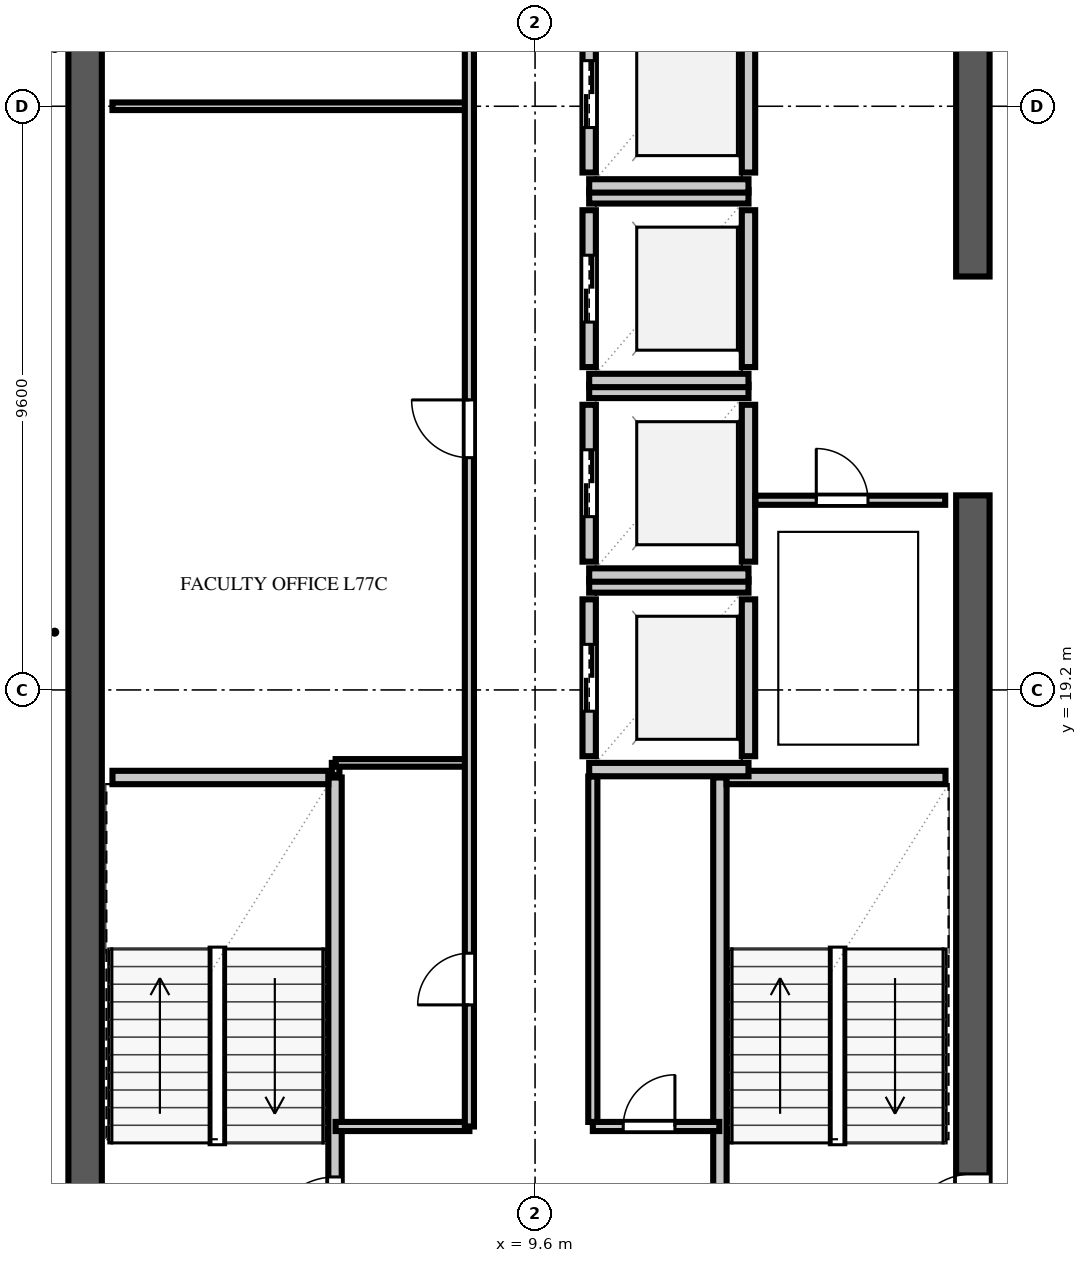
"""IFC4 building model, lengths in metres.
Left out: names, types, materials, properties, quantities, classifications, styles, units other than length and angle.
Written with IfcOpenShell. Run it as: python <this file> out.ifc"""

import sys

from ifc_helpers import new_model, si_unit, direction, frame, frame_2d, origin, place, context, subcontext, project, spatial, rectangle, extrude, element, fill, save


model = new_model("IFC4")
c1 = context("Model", 3, precision=1e-05, world=origin(), true_north=direction((0.0, 1.0)))
c2 = subcontext(c1, "Body", "Model", "MODEL_VIEW")
j1 = project(units=[si_unit("LENGTHUNIT", "METRE"), si_unit("PLANEANGLEUNIT", "RADIAN")], contexts=[c1])
p1 = place(None, origin())
s1 = spatial("IfcSite", under=j1, at=p1, CompositionType="ELEMENT")
p2 = place(p1, origin())
s2 = spatial("IfcBuilding", under=s1, at=p2, CompositionType="ELEMENT")
p3 = place(p2, frame((0.0, 0.0, 303.8)))
s3 = spatial("IfcBuildingStorey", under=s2, at=p3, CompositionType="ELEMENT", Elevation=303.8)
p4 = place(p3, frame((2.2, 9.325, 0.0), z_axis=(0.0, 0.0, 1.0), x_axis=(0.0, 1.0, 0.0)))
e1 = element("IfcWall", 1, at=p4, inside=s3, PredefinedType="SHEAR", context=c2, shape_type="SweptSolid", body=[
    extrude(rectangle(XDim=38.95, YDim=0.55, at=frame_2d((19.475, 0.0))), origin(), (0.0, 0.0, 1.0), 3.88),
])
p5 = place(p3, frame((16.8, 9.875, 0.0), z_axis=(0.0, 0.0, 1.0), x_axis=(0.0, 1.0, 0.0)))
e2 = element("IfcWall", 2, at=p5, inside=s3, PredefinedType="SHEAR", context=c2, shape_type="SweptSolid", body=[
    extrude(rectangle(XDim=12.525, YDim=0.55, at=frame_2d((6.262, 0.0))), origin(), (0.0, 0.0, 1.0), 3.88),
])
p6 = place(p5, frame((0.265, 0.0, 0.0)))
e3 = element("IfcOpeningElement", 3, at=p6, cuts=e2, PredefinedType="OPENING", context=c2, shape_type="SweptSolid", body=[
    extrude(rectangle(XDim=1.1, YDim=2.2, at=frame_2d((0.55, 1.1))), frame((0.0, 0.287, 0.0), z_axis=(0.0, -1.0, 0.0), x_axis=(1.0, 0.0, 0.0)), (0.0, 0.0, 1.0), 0.574),
])
p7 = place(p3, frame((16.8, 26.0, 0.0), z_axis=(0.0, 0.0, 1.0), x_axis=(0.0, 1.0, 0.0)))
e4 = element("IfcWall", 4, at=p7, inside=s3, PredefinedType="SHEAR", context=c2, shape_type="SweptSolid", body=[
    extrude(rectangle(XDim=7.8, YDim=0.55, at=frame_2d((3.9, 0.0))), origin(), (0.0, 0.0, 1.0), 3.88),
])
p8 = place(p3, frame((6.31, 9.95, 0.0), z_axis=(0.0, 0.0, 1.0), x_axis=(0.0, 1.0, 0.0)))
e5 = element("IfcWall", 5, at=p8, inside=s3, PredefinedType="SOLIDWALL", context=c2, shape_type="SweptSolid", body=[
    extrude(rectangle(XDim=7.81, YDim=0.22, at=frame_2d((3.905, 0.0))), origin(), (0.0, 0.0, 1.0), 3.88),
])
p9 = place(p8, frame((0.14, 0.0, 0.0)))
e6 = element("IfcOpeningElement", 6, at=p9, cuts=e5, PredefinedType="OPENING", context=c2, shape_type="SweptSolid", body=[
    extrude(rectangle(XDim=1.1, YDim=2.2, at=frame_2d((0.55, 1.1))), frame((0.0, 0.122, 0.0), z_axis=(0.0, -1.0, 0.0), x_axis=(1.0, 0.0, 0.0)), (0.0, 0.0, 1.0), 0.244),
])
p10 = place(p3, frame((2.65, 17.76, 0.0), z_axis=(0.0, 0.0, 1.0), x_axis=(1.0, 0.0, 0.0)))
e7 = element("IfcWall", 7, at=p10, inside=s3, PredefinedType="SOLIDWALL", context=c2, shape_type="SweptSolid", body=[
    extrude(rectangle(XDim=3.55, YDim=0.22, at=frame_2d((1.775, 0.0))), origin(), (0.0, 0.0, 1.0), 3.88),
])
p11 = place(p3, frame((12.64, 10.05, 0.0), z_axis=(0.0, 0.0, 1.0), x_axis=(0.0, 1.0, 0.0)))
e8 = element("IfcWall", 8, at=p11, inside=s3, PredefinedType="SOLIDWALL", context=c2, shape_type="SweptSolid", body=[
    extrude(rectangle(XDim=7.71, YDim=0.22, at=frame_2d((3.855, 0.0))), origin(), (0.0, 0.0, 1.0), 3.88),
])
p12 = place(p3, frame((12.75, 17.76, 0.0), z_axis=(0.0, 0.0, 1.0), x_axis=(1.0, 0.0, 0.0)))
e9 = element("IfcWall", 9, at=p12, inside=s3, PredefinedType="SOLIDWALL", context=c2, shape_type="SweptSolid", body=[
    extrude(rectangle(XDim=3.6, YDim=0.22, at=frame_2d((1.8, 0.0))), origin(), (0.0, 0.0, 1.0), 3.88),
])
p13 = place(p3, frame((10.49, 18.11, 0.0), z_axis=(0.0, 0.0, 1.0), x_axis=(0.0, 1.0, 0.0)))
e10 = element("IfcWall", 10, at=p13, inside=s3, PredefinedType="SOLIDWALL", context=c2, shape_type="SweptSolid", body=[
    extrude(rectangle(XDim=2.58, YDim=0.22, at=frame_2d((1.29, 0.0))), origin(), (0.0, 0.0, 1.0), 3.88),
])
p14 = place(p13, frame((0.74, 0.0, 0.0)))
e11 = element("IfcOpeningElement", 11, at=p14, cuts=e10, PredefinedType="OPENING", context=c2, shape_type="SweptSolid", body=[
    extrude(rectangle(XDim=1.1, YDim=2.2, at=frame_2d((0.55, 1.1))), frame((0.0, 0.122, 0.0), z_axis=(0.0, -1.0, 0.0), x_axis=(1.0, 0.0, 0.0)), (0.0, 0.0, 1.0), 0.244),
])
p15 = place(p3, frame((13.11, 18.11, 0.0), z_axis=(0.0, 0.0, 1.0), x_axis=(0.0, 1.0, 0.0)))
e12 = element("IfcWall", 12, at=p15, inside=s3, PredefinedType="SOLIDWALL", context=c2, shape_type="SweptSolid", body=[
    extrude(rectangle(XDim=2.58, YDim=0.22, at=frame_2d((1.29, 0.0))), origin(), (0.0, 0.0, 1.0), 3.88),
])
for number, where, z_axis, x_axis in (
    (13, (10.49, 17.89, 0.0), (0.0, 0.0, 1.0), (1.0, 0.0, 0.0)),
    (14, (10.49, 20.91, 0.0), (0.0, 0.0, 1.0), (1.0, 0.0, 0.0)),
):
    element("IfcWall", number, at=place(p3, frame(where, z_axis=z_axis, x_axis=x_axis)), inside=s3, PredefinedType="SOLIDWALL", context=c2, shape_type="SweptSolid", body=[
        extrude(rectangle(XDim=2.62, YDim=0.22, at=frame_2d((1.31, 0.0))), origin(), (0.0, 0.0, 1.0), 3.88),
    ])
p16 = place(p3, frame((10.49, 21.31, 0.0), z_axis=(0.0, 0.0, 1.0), x_axis=(0.0, 1.0, 0.0)))
e15 = element("IfcWall", 15, at=p16, inside=s3, PredefinedType="SOLIDWALL", context=c2, shape_type="SweptSolid", body=[
    extrude(rectangle(XDim=2.58, YDim=0.22, at=frame_2d((1.29, 0.0))), origin(), (0.0, 0.0, 1.0), 3.88),
])
p17 = place(p16, frame((0.74, 0.0, 0.0)))
e16 = element("IfcOpeningElement", 16, at=p17, cuts=e15, PredefinedType="OPENING", context=c2, shape_type="SweptSolid", body=[
    extrude(rectangle(XDim=1.1, YDim=2.2, at=frame_2d((0.55, 1.1))), frame((0.0, 0.122, 0.0), z_axis=(0.0, -1.0, 0.0), x_axis=(1.0, 0.0, 0.0)), (0.0, 0.0, 1.0), 0.244),
])
p18 = place(p3, frame((13.11, 21.31, 0.0), z_axis=(0.0, 0.0, 1.0), x_axis=(0.0, 1.0, 0.0)))
e17 = element("IfcWall", 17, at=p18, inside=s3, PredefinedType="SOLIDWALL", context=c2, shape_type="SweptSolid", body=[
    extrude(rectangle(XDim=2.58, YDim=0.22, at=frame_2d((1.29, 0.0))), origin(), (0.0, 0.0, 1.0), 3.88),
])
for number, where, z_axis, x_axis in (
    (18, (10.49, 21.09, 0.0), (0.0, 0.0, 1.0), (1.0, 0.0, 0.0)),
    (19, (10.49, 24.11, 0.0), (0.0, 0.0, 1.0), (1.0, 0.0, 0.0)),
):
    element("IfcWall", number, at=place(p3, frame(where, z_axis=z_axis, x_axis=x_axis)), inside=s3, PredefinedType="SOLIDWALL", context=c2, shape_type="SweptSolid", body=[
        extrude(rectangle(XDim=2.62, YDim=0.22, at=frame_2d((1.31, 0.0))), origin(), (0.0, 0.0, 1.0), 3.88),
    ])
p19 = place(p3, frame((10.49, 24.51, 0.0), z_axis=(0.0, 0.0, 1.0), x_axis=(0.0, 1.0, 0.0)))
e20 = element("IfcWall", 20, at=p19, inside=s3, PredefinedType="SOLIDWALL", context=c2, shape_type="SweptSolid", body=[
    extrude(rectangle(XDim=2.58, YDim=0.22, at=frame_2d((1.29, 0.0))), origin(), (0.0, 0.0, 1.0), 3.88),
])
p20 = place(p19, frame((0.74, 0.0, 0.0)))
e21 = element("IfcOpeningElement", 21, at=p20, cuts=e20, PredefinedType="OPENING", context=c2, shape_type="SweptSolid", body=[
    extrude(rectangle(XDim=1.1, YDim=2.2, at=frame_2d((0.55, 1.1))), frame((0.0, 0.122, 0.0), z_axis=(0.0, -1.0, 0.0), x_axis=(1.0, 0.0, 0.0)), (0.0, 0.0, 1.0), 0.244),
])
p21 = place(p3, frame((13.11, 24.51, 0.0), z_axis=(0.0, 0.0, 1.0), x_axis=(0.0, 1.0, 0.0)))
e22 = element("IfcWall", 22, at=p21, inside=s3, PredefinedType="SOLIDWALL", context=c2, shape_type="SweptSolid", body=[
    extrude(rectangle(XDim=2.58, YDim=0.22, at=frame_2d((1.29, 0.0))), origin(), (0.0, 0.0, 1.0), 3.88),
])
for number, where, z_axis, x_axis in (
    (23, (10.49, 24.29, 0.0), (0.0, 0.0, 1.0), (1.0, 0.0, 0.0)),
    (24, (10.49, 27.31, 0.0), (0.0, 0.0, 1.0), (1.0, 0.0, 0.0)),
):
    element("IfcWall", number, at=place(p3, frame(where, z_axis=z_axis, x_axis=x_axis)), inside=s3, PredefinedType="SOLIDWALL", context=c2, shape_type="SweptSolid", body=[
        extrude(rectangle(XDim=2.62, YDim=0.22, at=frame_2d((1.31, 0.0))), origin(), (0.0, 0.0, 1.0), 3.88),
    ])
p22 = place(p3, frame((10.49, 27.71, 0.0), z_axis=(0.0, 0.0, 1.0), x_axis=(0.0, 1.0, 0.0)))
e25 = element("IfcWall", 25, at=p22, inside=s3, PredefinedType="SOLIDWALL", context=c2, shape_type="SweptSolid", body=[
    extrude(rectangle(XDim=2.58, YDim=0.22, at=frame_2d((1.29, 0.0))), origin(), (0.0, 0.0, 1.0), 3.88),
])
p23 = place(p22, frame((0.74, 0.0, 0.0)))
e26 = element("IfcOpeningElement", 26, at=p23, cuts=e25, PredefinedType="OPENING", context=c2, shape_type="SweptSolid", body=[
    extrude(rectangle(XDim=1.1, YDim=2.2, at=frame_2d((0.55, 1.1))), frame((0.0, 0.122, 0.0), z_axis=(0.0, -1.0, 0.0), x_axis=(1.0, 0.0, 0.0)), (0.0, 0.0, 1.0), 0.244),
])
p24 = place(p3, frame((13.11, 27.71, 0.0), z_axis=(0.0, 0.0, 1.0), x_axis=(0.0, 1.0, 0.0)))
e27 = element("IfcWall", 27, at=p24, inside=s3, PredefinedType="SOLIDWALL", context=c2, shape_type="SweptSolid", body=[
    extrude(rectangle(XDim=2.58, YDim=0.22, at=frame_2d((1.29, 0.0))), origin(), (0.0, 0.0, 1.0), 3.88),
])
p25 = place(p3, frame((10.49, 27.49, 0.0), z_axis=(0.0, 0.0, 1.0), x_axis=(1.0, 0.0, 0.0)))
e28 = element("IfcWall", 28, at=p25, inside=s3, PredefinedType="SOLIDWALL", context=c2, shape_type="SweptSolid", body=[
    extrude(rectangle(XDim=2.62, YDim=0.22, at=frame_2d((1.31, 0.0))), origin(), (0.0, 0.0, 1.0), 3.88),
])
p26 = place(p3, frame((10.55, 12.02, 0.0), z_axis=(0.0, 0.0, 1.0), x_axis=(1.0, 0.0, 0.0)))
e29 = element("IfcWall", 29, at=p26, inside=s3, PredefinedType="PARTITIONING", context=c2, shape_type="SweptSolid", body=[
    extrude(rectangle(XDim=2.08, YDim=0.15, at=frame_2d((1.04, 0.0))), origin(), (0.0, 0.0, 1.0), 3.88),
])
p27 = place(p26, frame((0.5, 0.0, 0.0)))
e30 = element("IfcOpeningElement", 30, at=p27, cuts=e29, PredefinedType="OPENING", context=c2, shape_type="SweptSolid", body=[
    extrude(rectangle(XDim=0.85, YDim=2.1, at=frame_2d((0.425, 1.05))), frame((0.0, 0.087, 0.0), z_axis=(0.0, -1.0, 0.0), x_axis=(1.0, 0.0, 0.0)), (0.0, 0.0, 1.0), 0.174),
])
p28 = place(p3, frame((10.55, 12.095, 0.0), z_axis=(0.0, 0.0, 1.0), x_axis=(0.0, 1.0, 0.0)))
e31 = element("IfcWall", 31, at=p28, inside=s3, PredefinedType="PARTITIONING", context=c2, shape_type="SweptSolid", body=[
    extrude(rectangle(XDim=5.68, YDim=0.15, at=frame_2d((2.84, 0.0))), origin(), (0.0, 0.0, 1.0), 3.88),
])
p29 = place(p3, frame((13.225, 22.32, 0.0), z_axis=(0.0, 0.0, 1.0), x_axis=(1.0, 0.0, 0.0)))
e32 = element("IfcWall", 32, at=p29, inside=s3, PredefinedType="PARTITIONING", context=c2, shape_type="SweptSolid", body=[
    extrude(rectangle(XDim=3.12, YDim=0.15, at=frame_2d((1.56, 0.0))), origin(), (0.0, 0.0, 1.0), 3.88),
])
p30 = place(p29, frame((1.0, 0.0, 0.0)))
e33 = element("IfcOpeningElement", 33, at=p30, cuts=e32, PredefinedType="OPENING", context=c2, shape_type="SweptSolid", body=[
    extrude(rectangle(XDim=0.85, YDim=2.1, at=frame_2d((0.425, 1.05))), frame((0.0, 0.087, 0.0), z_axis=(0.0, -1.0, 0.0), x_axis=(1.0, 0.0, 0.0)), (0.0, 0.0, 1.0), 0.174),
])
p31 = place(p3, frame((6.32, 12.02, 0.0), z_axis=(0.0, 0.0, 1.0), x_axis=(1.0, 0.0, 0.0)))
e34 = element("IfcWall", 34, at=p31, inside=s3, PredefinedType="PARTITIONING", context=c2, shape_type="SweptSolid", body=[
    extrude(rectangle(XDim=2.2, YDim=0.15, at=frame_2d((1.1, 0.0))), origin(), (0.0, 0.0, 1.0), 3.88),
])
p32 = place(p3, frame((6.32, 17.8, 0.0), z_axis=(0.0, 0.0, 1.0), x_axis=(0.0, 1.0, 0.0)))
e35 = element("IfcWall", 35, at=p32, inside=s3, PredefinedType="PARTITIONING", context=c2, shape_type="SweptSolid", body=[
    extrude(rectangle(XDim=0.2, YDim=0.125, at=frame_2d((0.1, 0.0))), origin(), (0.0, 0.0, 1.0), 3.88),
])
p33 = place(p3, frame((6.32, 18.0, 0.0), z_axis=(0.0, 0.0, 1.0), x_axis=(1.0, 0.0, 0.0)))
e36 = element("IfcWall", 36, at=p33, inside=s3, PredefinedType="PARTITIONING", context=c2, shape_type="SweptSolid", body=[
    extrude(rectangle(XDim=2.2, YDim=0.125, at=frame_2d((1.1, 0.0))), origin(), (0.0, 0.0, 1.0), 3.88),
])
p34 = place(p3, frame((2.65, 28.8, 0.0), z_axis=(0.0, 0.0, 1.0), x_axis=(1.0, 0.0, 0.0)))
e37 = element("IfcWall", 37, at=p34, inside=s3, PredefinedType="PARTITIONING", context=c2, shape_type="SweptSolid", body=[
    extrude(rectangle(XDim=5.87, YDim=0.125, at=frame_2d((2.935, 0.0))), origin(), (0.0, 0.0, 1.0), 3.88),
])
p35 = place(p3, frame((8.52, 12.02, 0.0), z_axis=(0.0, 0.0, 1.0), x_axis=(0.0, 1.0, 0.0)))
e38 = element("IfcWall", 38, at=p35, inside=s3, PredefinedType="PARTITIONING", context=c2, shape_type="SweptSolid", body=[
    extrude(rectangle(XDim=24.76, YDim=0.15, at=frame_2d((12.38, 0.0))), origin(), (0.0, 0.0, 1.0), 3.88),
])
p36 = place(p35, frame((2.0, 0.0, 0.0)))
e39 = element("IfcOpeningElement", 39, at=p36, cuts=e38, PredefinedType="OPENING", context=c2, shape_type="SweptSolid", body=[
    extrude(rectangle(XDim=0.85, YDim=2.1, at=frame_2d((0.425, 1.05))), frame((0.0, 0.087, 0.0), z_axis=(0.0, -1.0, 0.0), x_axis=(1.0, 0.0, 0.0)), (0.0, 0.0, 1.0), 0.174),
])
p37 = place(p35, frame((11.0, 0.0, 0.0)))
e40 = element("IfcOpeningElement", 40, at=p37, cuts=e38, PredefinedType="OPENING", context=c2, shape_type="SweptSolid", body=[
    extrude(rectangle(XDim=0.95, YDim=2.15, at=frame_2d((0.475, 1.075))), frame((0.0, 0.087, 0.0), z_axis=(0.0, -1.0, 0.0), x_axis=(1.0, 0.0, 0.0)), (0.0, 0.0, 1.0), 0.174),
])
p38 = place(p35, frame((18.0, 0.0, 0.0)))
e41 = element("IfcOpeningElement", 41, at=p38, cuts=e38, PredefinedType="OPENING", context=c2, shape_type="SweptSolid", body=[
    extrude(rectangle(XDim=0.95, YDim=2.15, at=frame_2d((0.475, 1.075))), frame((0.0, 0.087, 0.0), z_axis=(0.0, -1.0, 0.0), x_axis=(1.0, 0.0, 0.0)), (0.0, 0.0, 1.0), 0.174),
])
p39 = place(p9, origin())
e42 = element("IfcDoor", 42, at=p39, inside=s3, OperationType="SINGLE_SWING_LEFT", PredefinedType="DOOR", context=c2, shape_type="SweptSolid", body=[
    extrude(rectangle(XDim=1.1, YDim=2.2, at=frame_2d((0.55, 1.1))), frame((0.0, 0.025, 0.0), z_axis=(0.0, -1.0, 0.0), x_axis=(1.0, 0.0, 0.0)), (0.0, 0.0, 1.0), 0.05),
])
fill(e6, e42)
p40 = place(p6, origin())
e43 = element("IfcDoor", 43, at=p40, inside=s3, OperationType="SINGLE_SWING_LEFT", PredefinedType="DOOR", context=c2, shape_type="SweptSolid", body=[
    extrude(rectangle(XDim=1.1, YDim=2.2, at=frame_2d((0.55, 1.1))), frame((0.0, 0.025, 0.0), z_axis=(0.0, -1.0, 0.0), x_axis=(1.0, 0.0, 0.0)), (0.0, 0.0, 1.0), 0.05),
])
fill(e3, e43)
p41 = place(p14, origin())
e44 = element("IfcDoor", 44, at=p41, inside=s3, OperationType="DOUBLE_DOOR_SLIDING", PredefinedType="DOOR", context=c2, shape_type="SweptSolid", body=[
    extrude(rectangle(XDim=1.1, YDim=2.2, at=frame_2d((0.55, 1.1))), frame((0.0, 0.025, 0.0), z_axis=(0.0, -1.0, 0.0), x_axis=(1.0, 0.0, 0.0)), (0.0, 0.0, 1.0), 0.05),
])
fill(e11, e44)
p42 = place(p17, origin())
e45 = element("IfcDoor", 45, at=p42, inside=s3, OperationType="DOUBLE_DOOR_SLIDING", PredefinedType="DOOR", context=c2, shape_type="SweptSolid", body=[
    extrude(rectangle(XDim=1.1, YDim=2.2, at=frame_2d((0.55, 1.1))), frame((0.0, 0.025, 0.0), z_axis=(0.0, -1.0, 0.0), x_axis=(1.0, 0.0, 0.0)), (0.0, 0.0, 1.0), 0.05),
])
fill(e16, e45)
p43 = place(p20, origin())
e46 = element("IfcDoor", 46, at=p43, inside=s3, OperationType="DOUBLE_DOOR_SLIDING", PredefinedType="DOOR", context=c2, shape_type="SweptSolid", body=[
    extrude(rectangle(XDim=1.1, YDim=2.2, at=frame_2d((0.55, 1.1))), frame((0.0, 0.025, 0.0), z_axis=(0.0, -1.0, 0.0), x_axis=(1.0, 0.0, 0.0)), (0.0, 0.0, 1.0), 0.05),
])
fill(e21, e46)
p44 = place(p23, origin())
e47 = element("IfcDoor", 47, at=p44, inside=s3, OperationType="DOUBLE_DOOR_SLIDING", PredefinedType="DOOR", context=c2, shape_type="SweptSolid", body=[
    extrude(rectangle(XDim=1.1, YDim=2.2, at=frame_2d((0.55, 1.1))), frame((0.0, 0.025, 0.0), z_axis=(0.0, -1.0, 0.0), x_axis=(1.0, 0.0, 0.0)), (0.0, 0.0, 1.0), 0.05),
])
fill(e26, e47)
p45 = place(p27, origin())
e48 = element("IfcDoor", 48, at=p45, inside=s3, OperationType="SINGLE_SWING_RIGHT", PredefinedType="DOOR", context=c2, shape_type="SweptSolid", body=[
    extrude(rectangle(XDim=0.85, YDim=2.1, at=frame_2d((0.425, 1.05))), frame((0.0, 0.025, 0.0), z_axis=(0.0, -1.0, 0.0), x_axis=(1.0, 0.0, 0.0)), (0.0, 0.0, 1.0), 0.05),
])
fill(e30, e48)
p46 = place(p30, origin())
e49 = element("IfcDoor", 49, at=p46, inside=s3, OperationType="SINGLE_SWING_LEFT", PredefinedType="DOOR", context=c2, shape_type="SweptSolid", body=[
    extrude(rectangle(XDim=0.85, YDim=2.1, at=frame_2d((0.425, 1.05))), frame((0.0, 0.025, 0.0), z_axis=(0.0, -1.0, 0.0), x_axis=(1.0, 0.0, 0.0)), (0.0, 0.0, 1.0), 0.05),
])
fill(e33, e49)
p47 = place(p36, origin())
e50 = element("IfcDoor", 50, at=p47, inside=s3, OperationType="SINGLE_SWING_LEFT", PredefinedType="DOOR", context=c2, shape_type="SweptSolid", body=[
    extrude(rectangle(XDim=0.85, YDim=2.1, at=frame_2d((0.425, 1.05))), frame((0.0, 0.025, 0.0), z_axis=(0.0, -1.0, 0.0), x_axis=(1.0, 0.0, 0.0)), (0.0, 0.0, 1.0), 0.05),
])
fill(e39, e50)
p48 = place(p37, origin())
e51 = element("IfcDoor", 51, at=p48, inside=s3, OperationType="SINGLE_SWING_RIGHT", PredefinedType="DOOR", context=c2, shape_type="SweptSolid", body=[
    extrude(rectangle(XDim=0.95, YDim=2.15, at=frame_2d((0.475, 1.075))), frame((0.0, 0.025, 0.0), z_axis=(0.0, -1.0, 0.0), x_axis=(1.0, 0.0, 0.0)), (0.0, 0.0, 1.0), 0.05),
])
fill(e40, e51)
save(model, sys.argv[1])
